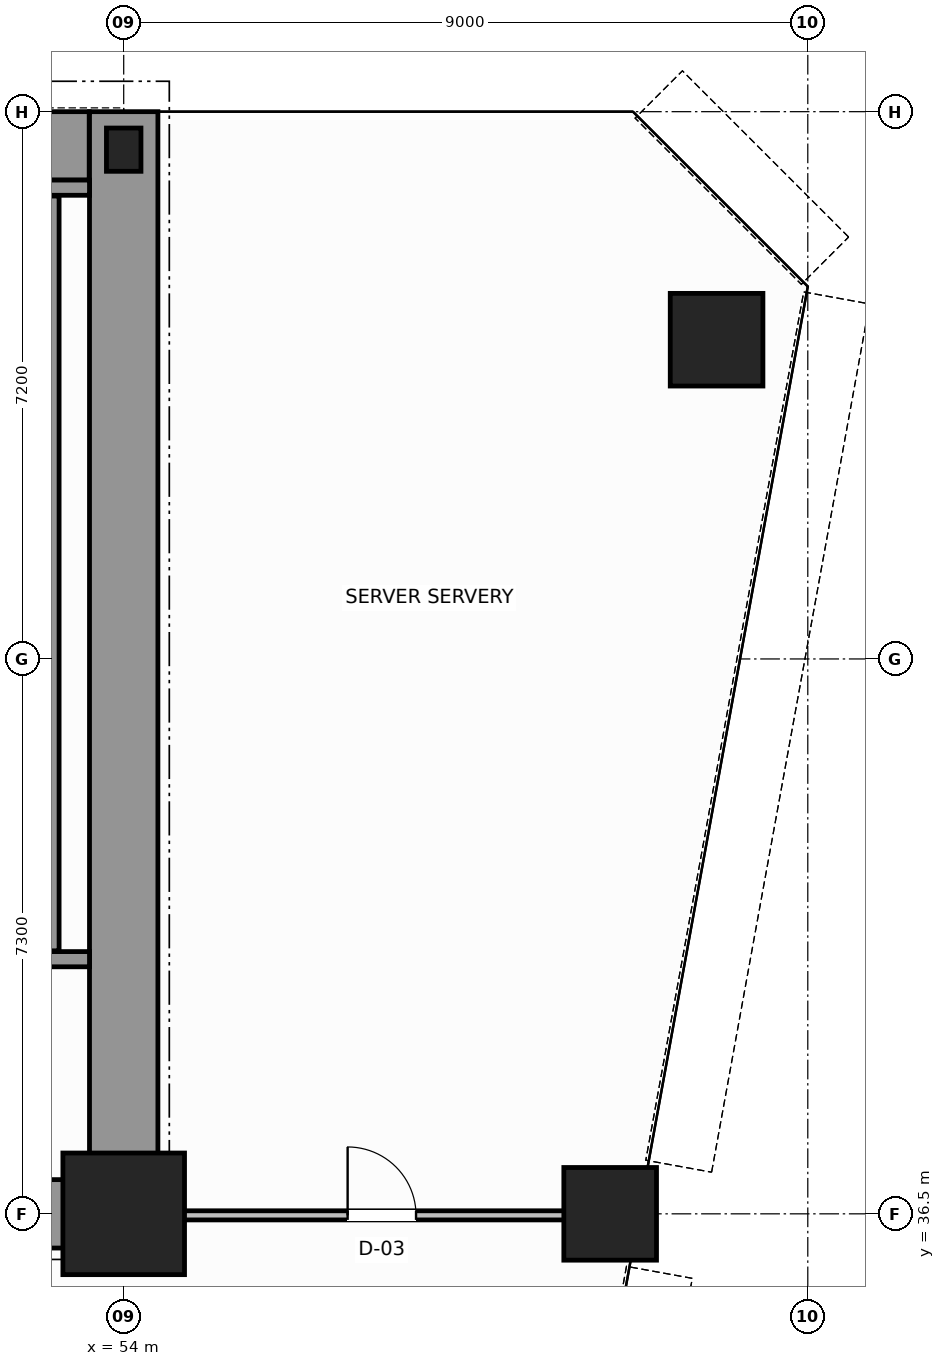
"""IFC4 building model, lengths in metres.
Left out: names, types, materials, properties, quantities, classifications, styles, units other than length and angle.
Written with IfcOpenShell. Run it as: python <this file> out.ifc"""

import sys

from ifc_helpers import new_model, si_unit, direction, frame, frame_2d, origin, origin_2d, place, context, subcontext, project, spatial, rectangle, hollow_circle, i_section, extrude, source, transform, mapped, element, fill, save


model = new_model("IFC4")
c1 = context("Model", 3, precision=1e-05, world=origin(), true_north=direction((0.0, 1.0)))
c2 = subcontext(c1, "Body", "Model", "MODEL_VIEW")
j1 = project(units=[si_unit("LENGTHUNIT", "METRE"), si_unit("PLANEANGLEUNIT", "RADIAN")], contexts=[c1])
p1 = place(None, origin())
s1 = spatial("IfcSite", under=j1, at=p1, CompositionType="ELEMENT")
p2 = place(p1, origin())
s2 = spatial("IfcBuilding", under=s1, at=p2, CompositionType="ELEMENT")
p3 = place(p2, frame((0.0, 0.0, 41.6)))
s3 = spatial("IfcBuildingStorey", under=s2, at=p3, CompositionType="ELEMENT", Elevation=41.6)
m1 = source(origin(), c2, "Body", "SweptSolid", [
    extrude(rectangle(XDim=1.6, YDim=1.6, at=origin_2d()), origin(), (0.0, 0.0, 1.0), 3.8),
])
p4 = place(p3, frame((54.0, 36.5, 0.0), z_axis=(0.0, 0.0, 1.0), x_axis=(1.0, 0.0, 0.0)))
e1 = element("IfcColumn", 1, at=p4, inside=s3, PredefinedType="COLUMN", context=c2, shape_type="MappedRepresentation", body=[
    mapped(m1, transform((0.0, 0.0, 0.0), scale=1.0)),
])
m2 = source(origin(), c2, "Body", "SweptSolid", [
    extrude(i_section(OverallWidth=0.454, OverallDepth=0.569, WebThickness=0.078, FlangeThickness=0.08, FilletRadius=0.015, at=origin_2d()), origin(), (0.0, 0.0, 1.0), 3.8),
])
p5 = place(p3, frame((54.0, 50.5, 0.0), z_axis=(0.0, 0.0, 1.0), x_axis=(1.0, 0.0, 0.0)))
e2 = element("IfcColumn", 2, at=p5, inside=s3, PredefinedType="COLUMN", context=c2, shape_type="MappedRepresentation", body=[
    mapped(m2, transform((0.0, 0.0, 0.0), scale=1.0)),
])
m3 = source(origin(), c2, "Body", "SweptSolid", [
    extrude(hollow_circle(Radius=0.61, WallThickness=0.05, at=origin_2d()), origin(), (0.0, 0.0, 1.0), 3.8),
])
for number, where, z_axis, x_axis in (
    (3, (61.8, 48.0, 0.0), (0.0, 0.0, 1.0), (1.0, 0.0, 0.0)),
    (4, (60.4, 36.5, 0.0), (0.0, 0.0, 1.0), (1.0, 0.0, 0.0)),
):
    element("IfcColumn", number, at=place(p3, frame(where, z_axis=z_axis, x_axis=x_axis)), inside=s3, PredefinedType="COLUMN", context=c2, shape_type="MappedRepresentation", body=[
        mapped(m3, transform((0.0, 0.0, 0.0), scale=1.0)),
    ])
p6 = place(p3, frame((34.002, 50.55, 0.0), z_axis=(0.0, 0.0, 1.0), x_axis=(1.0, 0.0, 0.0)))
e5 = element("IfcWall", 5, at=p6, inside=s3, PredefinedType="SHEAR", context=c2, shape_type="SweptSolid", body=[
    extrude(rectangle(XDim=19.544, YDim=0.9, at=frame_2d((9.772, 0.0))), origin(), (0.0, 0.0, 1.0), 3.8),
])
p7 = place(p3, frame((54.0, 36.5, 0.0), z_axis=(0.0, 0.0, 1.0), x_axis=(0.0, 1.0, 0.0)))
e6 = element("IfcWall", 6, at=p7, inside=s3, PredefinedType="SHEAR", context=c2, shape_type="SweptSolid", body=[
    extrude(rectangle(XDim=14.5, YDim=0.9, at=frame_2d((7.25, 0.0))), origin(), (0.0, 0.0, 1.0), 3.8),
])
p8 = place(p3, frame((49.8, 36.5, 0.0), z_axis=(0.0, 0.0, 1.0), x_axis=(1.0, 0.0, 0.0)))
e7 = element("IfcWall", 7, at=p8, inside=s3, PredefinedType="SHEAR", context=c2, shape_type="SweptSolid", body=[
    extrude(rectangle(XDim=3.73, YDim=0.9, at=frame_2d((1.865, 0.0))), origin(), (0.0, 0.0, 1.0), 2.38),
])
p9 = place(p3, frame((49.4, 39.85, 0.0), z_axis=(0.0, 0.0, 1.0), x_axis=(1.0, 0.0, 0.0)))
e8 = element("IfcWall", 8, at=p9, inside=s3, PredefinedType="SOLIDWALL", context=c2, shape_type="SweptSolid", body=[
    extrude(rectangle(XDim=4.15, YDim=0.2, at=frame_2d((2.075, 0.0))), origin(), (0.0, 0.0, 1.0), 3.8),
])
p10 = place(p9, frame((1.325, 0.0, 0.0)))
e9 = element("IfcOpeningElement", 9, at=p10, cuts=e8, PredefinedType="OPENING", context=c2, shape_type="SweptSolid", body=[
    extrude(rectangle(XDim=1.1, YDim=2.15, at=frame_2d((0.55, 1.075))), frame((0.0, 0.11, 0.0), z_axis=(0.0, -1.0, 0.0), x_axis=(1.0, 0.0, 0.0)), (0.0, 0.0, 1.0), 0.22),
])
p11 = place(p3, frame((49.4, 50.0, 0.0), z_axis=(0.0, 0.0, 1.0), x_axis=(1.0, 0.0, 0.0)))
e10 = element("IfcWall", 10, at=p11, inside=s3, PredefinedType="SOLIDWALL", context=c2, shape_type="SweptSolid", body=[
    extrude(rectangle(XDim=4.15, YDim=0.2, at=frame_2d((2.075, 0.0))), origin(), (0.0, 0.0, 1.0), 3.8),
])
p12 = place(p3, frame((53.05, 39.96, 0.0), z_axis=(0.0, 0.0, 1.0), x_axis=(0.0, 1.0, 0.0)))
e11 = element("IfcWall", 11, at=p12, inside=s3, PredefinedType="SOLIDWALL", context=c2, shape_type="SweptSolid", body=[
    extrude(rectangle(XDim=9.93, YDim=0.2, at=frame_2d((4.965, 0.0))), origin(), (0.0, 0.0, 1.0), 3.8),
])
p13 = place(p3, frame((54.06, 36.48, 0.0), z_axis=(0.0, 0.0, 1.0), x_axis=(1.0, 0.0, 0.0)))
e12 = element("IfcWall", 12, at=p13, inside=s3, PredefinedType="PARTITIONING", context=c2, shape_type="SweptSolid", body=[
    extrude(rectangle(XDim=6.672, YDim=0.12, at=frame_2d((3.336, 0.0))), origin(), (0.0, 0.0, 1.0), 2.77),
])
p14 = place(p13, frame((2.886, 0.0, 0.0)))
e13 = element("IfcOpeningElement", 13, at=p14, cuts=e12, PredefinedType="OPENING", context=c2, shape_type="SweptSolid", body=[
    extrude(rectangle(XDim=0.9, YDim=2.15, at=frame_2d((0.45, 1.075))), frame((0.0, 0.07, 0.0), z_axis=(0.0, -1.0, 0.0), x_axis=(1.0, 0.0, 0.0)), (0.0, 0.0, 1.0), 0.14),
])
m4 = source(origin(), c2, "Body", "SweptSolid", [
    extrude(rectangle(XDim=0.9, YDim=2.15, at=frame_2d((0.45, 1.075))), frame((0.0, 0.025, 0.0), z_axis=(0.0, -1.0, 0.0), x_axis=(1.0, 0.0, 0.0)), (0.0, 0.0, 1.0), 0.05),
])
p15 = place(p14, origin())
e14 = element("IfcDoor", 14, at=p15, inside=s3, OperationType="SINGLE_SWING_RIGHT", PredefinedType="DOOR", context=c2, shape_type="MappedRepresentation", body=[
    mapped(m4, transform((0.0, 0.0, 0.0), scale=1.0)),
])
fill(e13, e14)
save(model, sys.argv[1])
